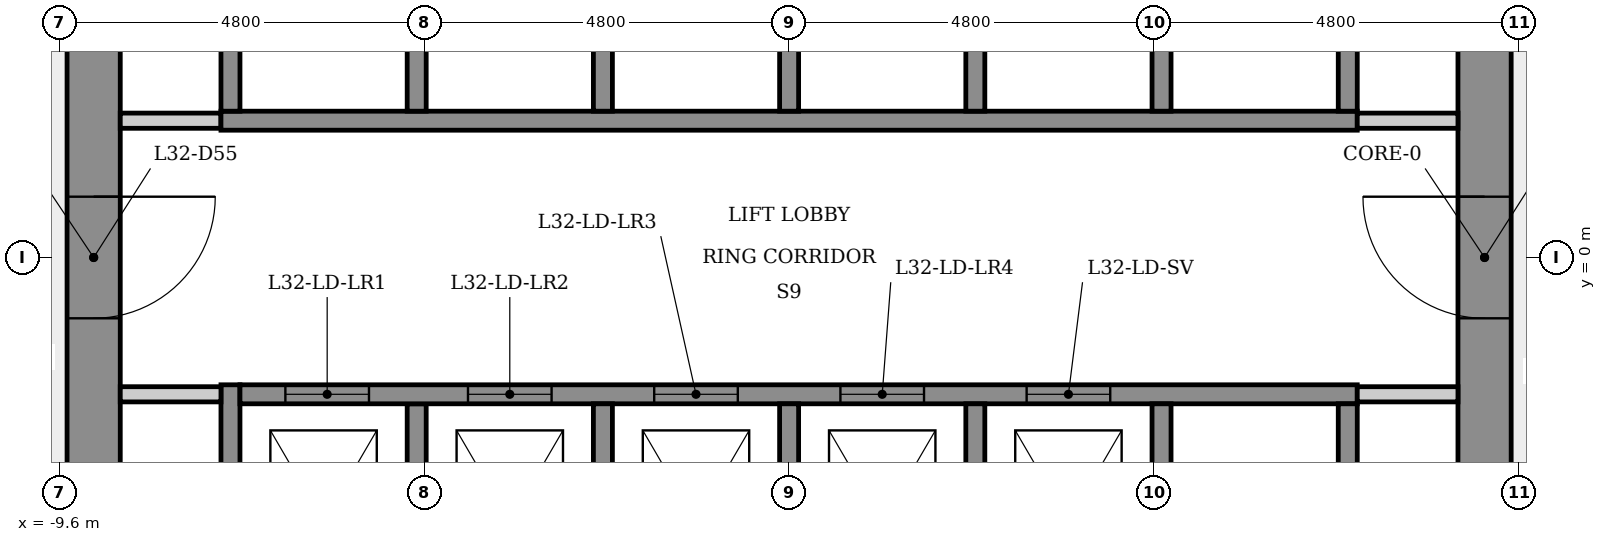
"""IFC4 building model, lengths in metres.
Left out: names, types, materials, properties, quantities, classifications, styles, units other than length and angle.
Written with IfcOpenShell. Run it as: python <this file> out.ifc"""

import sys

from ifc_helpers import new_model, si_unit, direction, frame, frame_2d, origin, place, context, subcontext, project, spatial, rectangle, extrude, element, fill, save


model = new_model("IFC4")
c1 = context("Model", 3, precision=1e-05, world=origin(), true_north=direction((0.0, 1.0)))
c2 = subcontext(c1, "Body", "Model", "MODEL_VIEW")
j1 = project(units=[si_unit("LENGTHUNIT", "METRE"), si_unit("PLANEANGLEUNIT", "RADIAN")], contexts=[c1])
p1 = place(None, origin())
s1 = spatial("IfcSite", under=j1, at=p1, CompositionType="ELEMENT")
p2 = place(p1, origin())
s2 = spatial("IfcBuilding", under=s1, at=p2, CompositionType="ELEMENT")
p3 = place(p2, frame((0.0, 0.0, 120.5)))
s3 = spatial("IfcBuildingStorey", under=s2, at=p3, CompositionType="ELEMENT", Elevation=120.5)
p4 = place(p3, frame((9.15, -5.485, 0.0), z_axis=(0.0, 0.0, 1.0), x_axis=(0.0, 1.0, 0.0)))
e1 = element("IfcWall", 1, at=p4, inside=s3, PredefinedType="SHEAR", context=c2, shape_type="SweptSolid", body=[
    extrude(rectangle(XDim=10.97, YDim=0.7, at=frame_2d((5.485, 0.0))), origin(), (0.0, 0.0, 1.0), 4.0),
])
p5 = place(p4, frame((4.685, 0.0, 0.0)))
e2 = element("IfcOpeningElement", 2, at=p5, cuts=e1, PredefinedType="OPENING", context=c2, shape_type="SweptSolid", body=[
    extrude(rectangle(XDim=1.6, YDim=2.1, at=frame_2d((0.8, 1.05))), frame((0.0, 0.36, 0.0), z_axis=(0.0, -1.0, 0.0), x_axis=(1.0, 0.0, 0.0)), (0.0, 0.0, 1.0), 0.72),
])
p6 = place(p3, frame((-9.15, 5.485, 0.0), z_axis=(0.0, 0.0, 1.0), x_axis=(0.0, -1.0, 0.0)))
e3 = element("IfcWall", 3, at=p6, inside=s3, PredefinedType="SHEAR", context=c2, shape_type="SweptSolid", body=[
    extrude(rectangle(XDim=10.97, YDim=0.7, at=frame_2d((5.485, 0.0))), origin(), (0.0, 0.0, 1.0), 4.0),
])
p7 = place(p6, frame((4.685, 0.0, 0.0)))
e4 = element("IfcOpeningElement", 4, at=p7, cuts=e3, PredefinedType="OPENING", context=c2, shape_type="SweptSolid", body=[
    extrude(rectangle(XDim=1.6, YDim=2.1, at=frame_2d((0.8, 1.05))), frame((0.0, 0.36, 0.0), z_axis=(0.0, -1.0, 0.0), x_axis=(1.0, 0.0, 0.0)), (0.0, 0.0, 1.0), 0.72),
])
p8 = place(p3, frame((-8.8, 1.8, 0.0), z_axis=(0.0, 0.0, 1.0), x_axis=(1.0, 0.0, 0.0)))
e5 = element("IfcWall", 5, at=p8, inside=s3, PredefinedType="PARTITIONING", context=c2, shape_type="SweptSolid", body=[
    extrude(rectangle(XDim=1.325, YDim=0.2, at=frame_2d((0.663, 0.0))), origin(), (0.0, 0.0, 1.0), 3.6),
])
p9 = place(p3, frame((-7.475, 1.8, 0.0), z_axis=(0.0, 0.0, 1.0), x_axis=(1.0, 0.0, 0.0)))
e6 = element("IfcWall", 6, at=p9, inside=s3, PredefinedType="SHEAR", context=c2, shape_type="SweptSolid", body=[
    extrude(rectangle(XDim=14.95, YDim=0.25, at=frame_2d((7.475, 0.0))), origin(), (0.0, 0.0, 1.0), 3.6),
])
p10 = place(p3, frame((-7.35, -5.846, 0.0), z_axis=(0.0, 0.0, 1.0), x_axis=(0.0, 1.0, 0.0)))
e7 = element("IfcWall", 7, at=p10, inside=s3, PredefinedType="SHEAR", context=c2, shape_type="SweptSolid", body=[
    extrude(rectangle(XDim=4.171, YDim=0.25, at=frame_2d((2.085, 0.0))), origin(), (0.0, 0.0, 1.0), 3.6),
])
p11 = place(p3, frame((-7.35, 1.925, 0.0), z_axis=(0.0, 0.0, 1.0), x_axis=(0.0, 1.0, 0.0)))
e8 = element("IfcWall", 8, at=p11, inside=s3, PredefinedType="SHEAR", context=c2, shape_type="SweptSolid", body=[
    extrude(rectangle(XDim=3.921, YDim=0.25, at=frame_2d((1.96, 0.0))), origin(), (0.0, 0.0, 1.0), 3.6),
])
p12 = place(p3, frame((-7.475, -1.8, 0.0), z_axis=(0.0, 0.0, 1.0), x_axis=(-1.0, 0.0, 0.0)))
e9 = element("IfcWall", 9, at=p12, inside=s3, PredefinedType="PARTITIONING", context=c2, shape_type="SweptSolid", body=[
    extrude(rectangle(XDim=1.325, YDim=0.2, at=frame_2d((0.663, 0.0))), origin(), (0.0, 0.0, 1.0), 3.6),
])
for number, where, z_axis, x_axis in (
    (10, (-4.9, -1.925, 0.0), (0.0, 0.0, 1.0), (0.0, -1.0, 0.0)),
    (11, (-4.9, 5.025, 0.0), (0.0, 0.0, 1.0), (0.0, -1.0, 0.0)),
):
    element("IfcWall", number, at=place(p3, frame(where, z_axis=z_axis, x_axis=x_axis)), inside=s3, PredefinedType="SHEAR", context=c2, shape_type="SweptSolid", body=[
        extrude(rectangle(XDim=3.1, YDim=0.25, at=frame_2d((1.55, 0.0))), origin(), (0.0, 0.0, 1.0), 4.0),
    ])
p13 = place(p3, frame((-7.225, -1.8, 0.0), z_axis=(0.0, 0.0, 1.0), x_axis=(1.0, 0.0, 0.0)))
e12 = element("IfcWall", 12, at=p13, inside=s3, PredefinedType="SHEAR", context=c2, shape_type="SweptSolid", body=[
    extrude(rectangle(XDim=14.7, YDim=0.25, at=frame_2d((7.35, 0.0))), origin(), (0.0, 0.0, 1.0), 3.6),
])
p14 = place(p13, frame((0.597, 0.0, 0.0)))
e13 = element("IfcOpeningElement", 13, at=p14, cuts=e12, PredefinedType="OPENING", context=c2, shape_type="SweptSolid", body=[
    extrude(rectangle(XDim=1.1, YDim=2.1, at=frame_2d((0.55, 1.05))), frame((0.0, 0.135, 0.0), z_axis=(0.0, -1.0, 0.0), x_axis=(1.0, 0.0, 0.0)), (0.0, 0.0, 1.0), 0.27),
])
p15 = place(p13, frame((3.0, 0.0, 0.0)))
e14 = element("IfcOpeningElement", 14, at=p15, cuts=e12, PredefinedType="OPENING", context=c2, shape_type="SweptSolid", body=[
    extrude(rectangle(XDim=1.1, YDim=2.1, at=frame_2d((0.55, 1.05))), frame((0.0, 0.135, 0.0), z_axis=(0.0, -1.0, 0.0), x_axis=(1.0, 0.0, 0.0)), (0.0, 0.0, 1.0), 0.27),
])
p16 = place(p13, frame((5.45, 0.0, 0.0)))
e15 = element("IfcOpeningElement", 15, at=p16, cuts=e12, PredefinedType="OPENING", context=c2, shape_type="SweptSolid", body=[
    extrude(rectangle(XDim=1.1, YDim=2.1, at=frame_2d((0.55, 1.05))), frame((0.0, 0.135, 0.0), z_axis=(0.0, -1.0, 0.0), x_axis=(1.0, 0.0, 0.0)), (0.0, 0.0, 1.0), 0.27),
])
p17 = place(p13, frame((7.9, 0.0, 0.0)))
e16 = element("IfcOpeningElement", 16, at=p17, cuts=e12, PredefinedType="OPENING", context=c2, shape_type="SweptSolid", body=[
    extrude(rectangle(XDim=1.1, YDim=2.1, at=frame_2d((0.55, 1.05))), frame((0.0, 0.135, 0.0), z_axis=(0.0, -1.0, 0.0), x_axis=(1.0, 0.0, 0.0)), (0.0, 0.0, 1.0), 0.27),
])
p18 = place(p13, frame((10.35, 0.0, 0.0)))
e17 = element("IfcOpeningElement", 17, at=p18, cuts=e12, PredefinedType="OPENING", context=c2, shape_type="SweptSolid", body=[
    extrude(rectangle(XDim=1.1, YDim=2.1, at=frame_2d((0.55, 1.05))), frame((0.0, 0.135, 0.0), z_axis=(0.0, -1.0, 0.0), x_axis=(1.0, 0.0, 0.0)), (0.0, 0.0, 1.0), 0.27),
])
for number, where, z_axis, x_axis in (
    (18, (-2.45, -1.925, 0.0), (0.0, 0.0, 1.0), (0.0, -1.0, 0.0)),
    (19, (-2.45, 5.025, 0.0), (0.0, 0.0, 1.0), (0.0, -1.0, 0.0)),
    (20, (0.0, -1.925, 0.0), (0.0, 0.0, 1.0), (0.0, -1.0, 0.0)),
    (21, (0.0, 5.025, 0.0), (0.0, 0.0, 1.0), (0.0, -1.0, 0.0)),
    (22, (2.45, -1.925, 0.0), (0.0, 0.0, 1.0), (0.0, -1.0, 0.0)),
    (23, (2.45, 5.025, 0.0), (0.0, 0.0, 1.0), (0.0, -1.0, 0.0)),
    (24, (4.9, -1.925, 0.0), (0.0, 0.0, 1.0), (0.0, -1.0, 0.0)),
    (25, (4.9, 5.025, 0.0), (0.0, 0.0, 1.0), (0.0, -1.0, 0.0)),
):
    element("IfcWall", number, at=place(p3, frame(where, z_axis=z_axis, x_axis=x_axis)), inside=s3, PredefinedType="SHEAR", context=c2, shape_type="SweptSolid", body=[
        extrude(rectangle(XDim=3.1, YDim=0.25, at=frame_2d((1.55, 0.0))), origin(), (0.0, 0.0, 1.0), 4.0),
    ])
p19 = place(p3, frame((7.475, 1.8, 0.0), z_axis=(0.0, 0.0, 1.0), x_axis=(1.0, 0.0, 0.0)))
e26 = element("IfcWall", 26, at=p19, inside=s3, PredefinedType="PARTITIONING", context=c2, shape_type="SweptSolid", body=[
    extrude(rectangle(XDim=1.325, YDim=0.2, at=frame_2d((0.663, 0.0))), origin(), (0.0, 0.0, 1.0), 3.6),
])
for number, where, z_axis, x_axis in (
    (27, (7.35, -1.925, 0.0), (0.0, 0.0, 1.0), (0.0, -1.0, 0.0)),
    (28, (7.35, 5.025, 0.0), (0.0, 0.0, 1.0), (0.0, -1.0, 0.0)),
):
    element("IfcWall", number, at=place(p3, frame(where, z_axis=z_axis, x_axis=x_axis)), inside=s3, PredefinedType="SHEAR", context=c2, shape_type="SweptSolid", body=[
        extrude(rectangle(XDim=3.1, YDim=0.25, at=frame_2d((1.55, 0.0))), origin(), (0.0, 0.0, 1.0), 4.0),
    ])
p20 = place(p3, frame((8.8, -1.8, 0.0), z_axis=(0.0, 0.0, 1.0), x_axis=(-1.0, 0.0, 0.0)))
e29 = element("IfcWall", 29, at=p20, inside=s3, PredefinedType="PARTITIONING", context=c2, shape_type="SweptSolid", body=[
    extrude(rectangle(XDim=1.325, YDim=0.2, at=frame_2d((0.663, 0.0))), origin(), (0.0, 0.0, 1.0), 3.6),
])
p21 = place(p14, origin())
e30 = element("IfcDoor", 30, at=p21, inside=s3, OperationType="SLIDING_TO_LEFT", PredefinedType="DOOR", context=c2, shape_type="SweptSolid", body=[
    extrude(rectangle(XDim=1.1, YDim=2.1, at=frame_2d((0.55, 1.05))), frame((0.0, 0.025, 0.0), z_axis=(0.0, -1.0, 0.0), x_axis=(1.0, 0.0, 0.0)), (0.0, 0.0, 1.0), 0.05),
])
fill(e13, e30)
p22 = place(p15, origin())
e31 = element("IfcDoor", 31, at=p22, inside=s3, OperationType="SLIDING_TO_LEFT", PredefinedType="DOOR", context=c2, shape_type="SweptSolid", body=[
    extrude(rectangle(XDim=1.1, YDim=2.1, at=frame_2d((0.55, 1.05))), frame((0.0, 0.025, 0.0), z_axis=(0.0, -1.0, 0.0), x_axis=(1.0, 0.0, 0.0)), (0.0, 0.0, 1.0), 0.05),
])
fill(e14, e31)
p23 = place(p16, origin())
e32 = element("IfcDoor", 32, at=p23, inside=s3, OperationType="SLIDING_TO_LEFT", PredefinedType="DOOR", context=c2, shape_type="SweptSolid", body=[
    extrude(rectangle(XDim=1.1, YDim=2.1, at=frame_2d((0.55, 1.05))), frame((0.0, 0.025, 0.0), z_axis=(0.0, -1.0, 0.0), x_axis=(1.0, 0.0, 0.0)), (0.0, 0.0, 1.0), 0.05),
])
fill(e15, e32)
p24 = place(p17, origin())
e33 = element("IfcDoor", 33, at=p24, inside=s3, OperationType="SLIDING_TO_LEFT", PredefinedType="DOOR", context=c2, shape_type="SweptSolid", body=[
    extrude(rectangle(XDim=1.1, YDim=2.1, at=frame_2d((0.55, 1.05))), frame((0.0, 0.025, 0.0), z_axis=(0.0, -1.0, 0.0), x_axis=(1.0, 0.0, 0.0)), (0.0, 0.0, 1.0), 0.05),
])
fill(e16, e33)
p25 = place(p18, origin())
e34 = element("IfcDoor", 34, at=p25, inside=s3, OperationType="SLIDING_TO_LEFT", PredefinedType="DOOR", context=c2, shape_type="SweptSolid", body=[
    extrude(rectangle(XDim=1.1, YDim=2.1, at=frame_2d((0.55, 1.05))), frame((0.0, 0.025, 0.0), z_axis=(0.0, -1.0, 0.0), x_axis=(1.0, 0.0, 0.0)), (0.0, 0.0, 1.0), 0.05),
])
fill(e17, e34)
p26 = place(p5, origin())
e35 = element("IfcDoor", 35, at=p26, inside=s3, OperationType="SINGLE_SWING_RIGHT", PredefinedType="DOOR", context=c2, shape_type="SweptSolid", body=[
    extrude(rectangle(XDim=1.6, YDim=2.1, at=frame_2d((0.8, 1.05))), frame((0.0, 0.025, 0.0), z_axis=(0.0, -1.0, 0.0), x_axis=(1.0, 0.0, 0.0)), (0.0, 0.0, 1.0), 0.05),
])
fill(e2, e35)
p27 = place(p7, origin())
e36 = element("IfcDoor", 36, at=p27, inside=s3, OperationType="SINGLE_SWING_LEFT", PredefinedType="DOOR", context=c2, shape_type="SweptSolid", body=[
    extrude(rectangle(XDim=1.6, YDim=2.1, at=frame_2d((0.8, 1.05))), frame((0.0, 0.025, 0.0), z_axis=(0.0, -1.0, 0.0), x_axis=(1.0, 0.0, 0.0)), (0.0, 0.0, 1.0), 0.05),
])
fill(e4, e36)
save(model, sys.argv[1])
